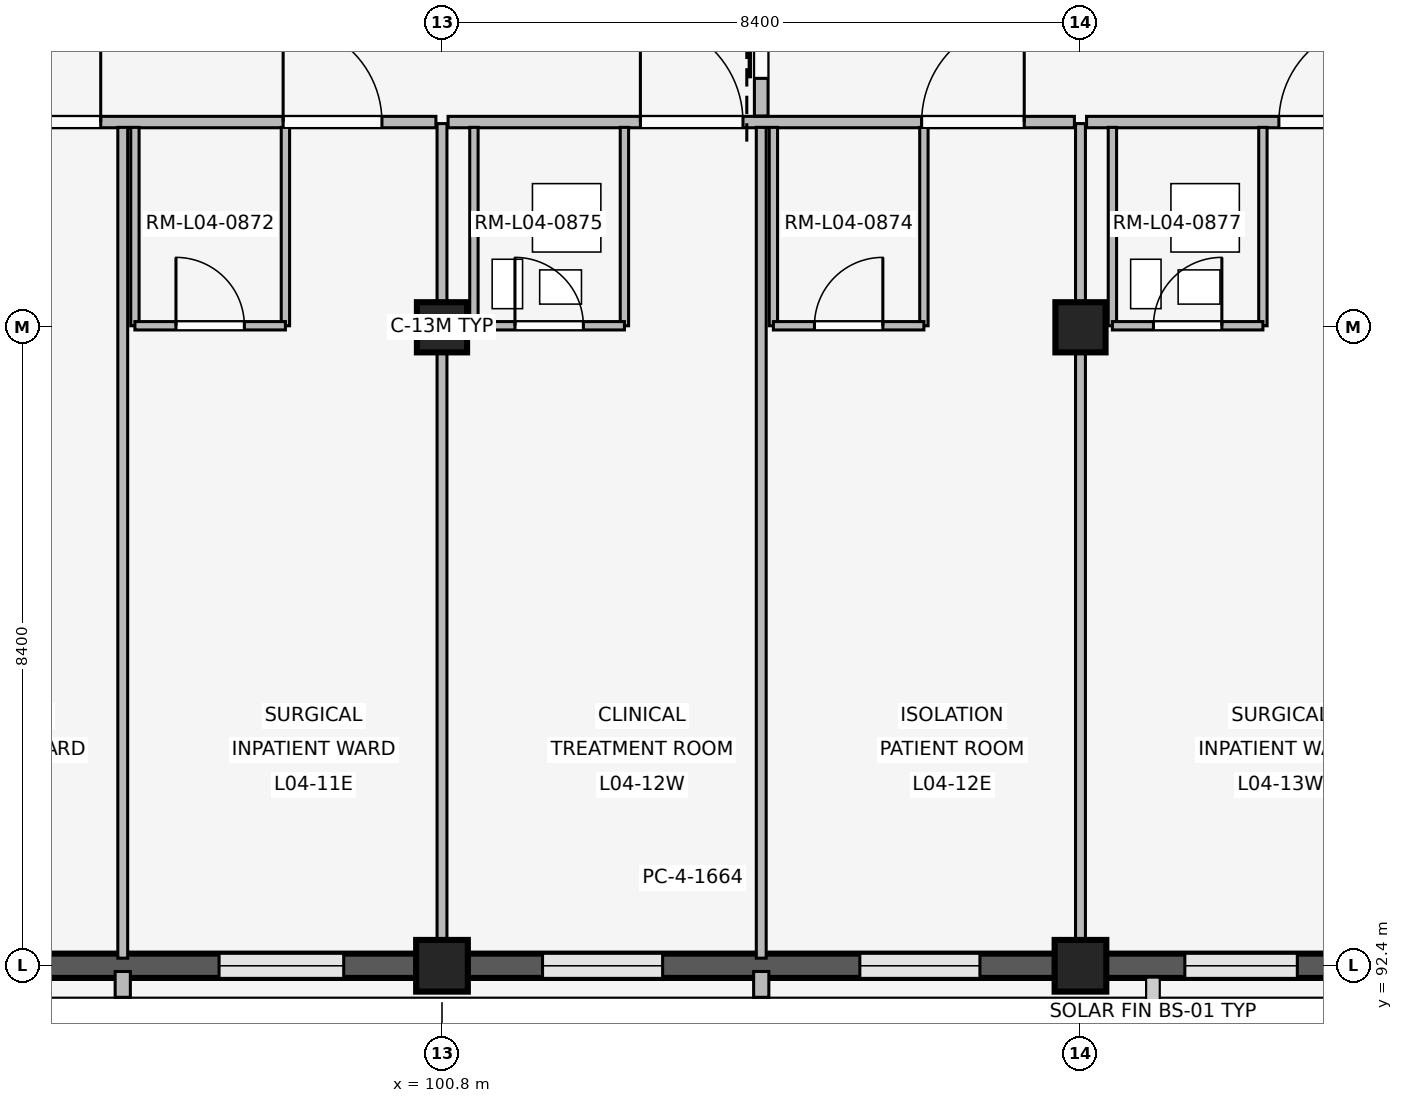
"""IFC4 building model, lengths in metres.
Left out: names, types, materials, properties, quantities, classifications, styles, units other than length and angle.
Written with IfcOpenShell. Run it as: python <this file> out.ifc"""

import sys

from ifc_helpers import new_model, si_unit, direction, frame, frame_2d, origin, origin_2d, place, context, subcontext, project, spatial, rectangle, extrude, element, fill, save


model = new_model("IFC4")
c1 = context("Model", 3, precision=1e-05, world=origin(), true_north=direction((0.0, 1.0)))
c2 = subcontext(c1, "Body", "Model", "MODEL_VIEW")
j1 = project(units=[si_unit("LENGTHUNIT", "METRE"), si_unit("PLANEANGLEUNIT", "RADIAN")], contexts=[c1])
p1 = place(None, origin())
s1 = spatial("IfcSite", under=j1, at=p1, CompositionType="ELEMENT")
p2 = place(p1, origin())
s2 = spatial("IfcBuilding", under=s1, at=p2, CompositionType="ELEMENT")
p3 = place(p2, frame((0.0, 0.0, 16.2)))
s3 = spatial("IfcBuildingStorey", under=s2, at=p3, CompositionType="ELEMENT", Elevation=16.2)
p4 = place(p3, frame((100.8, 92.4, 0.0), z_axis=(0.0, 0.0, 1.0), x_axis=(1.0, 0.0, 0.0)))
e1 = element("IfcColumn", 1, at=p4, inside=s3, PredefinedType="COLUMN", context=c2, shape_type="SweptSolid", body=[
    extrude(rectangle(XDim=0.68, YDim=0.68, at=origin_2d()), origin(), (0.0, 0.0, 1.0), 4.2),
])
p5 = place(p3, frame((100.8, 100.8, 0.0), z_axis=(0.0, 0.0, 1.0), x_axis=(1.0, 0.0, 0.0)))
e2 = element("IfcColumn", 2, at=p5, inside=s3, PredefinedType="COLUMN", context=c2, shape_type="SweptSolid", body=[
    extrude(rectangle(XDim=0.66, YDim=0.66, at=origin_2d()), origin(), (0.0, 0.0, 1.0), 4.2),
])
p6 = place(p3, frame((109.2, 92.4, 0.0), z_axis=(0.0, 0.0, 1.0), x_axis=(1.0, 0.0, 0.0)))
e3 = element("IfcColumn", 3, at=p6, inside=s3, PredefinedType="COLUMN", context=c2, shape_type="SweptSolid", body=[
    extrude(rectangle(XDim=0.68, YDim=0.68, at=origin_2d()), origin(), (0.0, 0.0, 1.0), 4.2),
])
p7 = place(p3, frame((109.2, 100.8, 0.0), z_axis=(0.0, 0.0, 1.0), x_axis=(1.0, 0.0, 0.0)))
e4 = element("IfcColumn", 4, at=p7, inside=s3, PredefinedType="COLUMN", context=c2, shape_type="SweptSolid", body=[
    extrude(rectangle(XDim=0.66, YDim=0.66, at=origin_2d()), origin(), (0.0, 0.0, 1.0), 4.2),
])
p8 = place(p3, frame((100.465, 92.4, 0.0), z_axis=(0.0, 0.0, 1.0), x_axis=(-1.0, 0.0, 0.0)))
e5 = element("IfcWall", 5, at=p8, inside=s3, PredefinedType="SOLIDWALL", context=c2, shape_type="SweptSolid", body=[
    extrude(rectangle(XDim=7.73, YDim=0.32, at=frame_2d((3.865, 0.0))), origin(), (0.0, 0.0, 1.0), 3.32),
])
p9 = place(p8, frame((0.958, 0.0, 0.85)))
e6 = element("IfcOpeningElement", 6, at=p9, cuts=e5, PredefinedType="OPENING", context=c2, shape_type="SweptSolid", body=[
    extrude(rectangle(XDim=1.64, YDim=1.75, at=frame_2d((0.82, 0.875))), frame((0.0, 0.17, 0.0), z_axis=(0.0, -1.0, 0.0), x_axis=(1.0, 0.0, 0.0)), (0.0, 0.0, 1.0), 0.34),
])
p10 = place(p8, frame((5.132, 0.0, 0.85)))
e7 = element("IfcOpeningElement", 7, at=p10, cuts=e5, PredefinedType="OPENING", context=c2, shape_type="SweptSolid", body=[
    extrude(rectangle(XDim=1.64, YDim=1.75, at=frame_2d((0.82, 0.875))), frame((0.0, 0.17, 0.0), z_axis=(0.0, -1.0, 0.0), x_axis=(1.0, 0.0, 0.0)), (0.0, 0.0, 1.0), 0.34),
])
p11 = place(p3, frame((96.6, 92.325, 0.0), z_axis=(0.0, 0.0, 1.0), x_axis=(0.0, -1.0, 0.0)))
e8 = element("IfcWall", 8, at=p11, inside=s3, PredefinedType="ELEMENTEDWALL", context=c2, shape_type="SweptSolid", body=[
    extrude(rectangle(XDim=0.34, YDim=0.2, at=frame_2d((0.17, 0.0))), origin(), (0.0, 0.0, 1.0), 3.3),
])
p12 = place(p3, frame((108.865, 92.4, 0.0), z_axis=(0.0, 0.0, 1.0), x_axis=(-1.0, 0.0, 0.0)))
e9 = element("IfcWall", 9, at=p12, inside=s3, PredefinedType="SOLIDWALL", context=c2, shape_type="SweptSolid", body=[
    extrude(rectangle(XDim=7.73, YDim=0.32, at=frame_2d((3.865, 0.0))), origin(), (0.0, 0.0, 1.0), 3.32),
])
p13 = place(p12, frame((0.988, 0.0, 0.85)))
e10 = element("IfcOpeningElement", 10, at=p13, cuts=e9, PredefinedType="OPENING", context=c2, shape_type="SweptSolid", body=[
    extrude(rectangle(XDim=1.58, YDim=1.7, at=frame_2d((0.79, 0.85))), frame((0.0, 0.17, 0.0), z_axis=(0.0, -1.0, 0.0), x_axis=(1.0, 0.0, 0.0)), (0.0, 0.0, 1.0), 0.34),
])
p14 = place(p12, frame((5.162, 0.0, 0.85)))
e11 = element("IfcOpeningElement", 11, at=p14, cuts=e9, PredefinedType="OPENING", context=c2, shape_type="SweptSolid", body=[
    extrude(rectangle(XDim=1.58, YDim=1.7, at=frame_2d((0.79, 0.85))), frame((0.0, 0.17, 0.0), z_axis=(0.0, -1.0, 0.0), x_axis=(1.0, 0.0, 0.0)), (0.0, 0.0, 1.0), 0.34),
])
p15 = place(p3, frame((105.0, 92.325, 0.0), z_axis=(0.0, 0.0, 1.0), x_axis=(0.0, -1.0, 0.0)))
e12 = element("IfcWall", 12, at=p15, inside=s3, PredefinedType="ELEMENTEDWALL", context=c2, shape_type="SweptSolid", body=[
    extrude(rectangle(XDim=0.34, YDim=0.2, at=frame_2d((0.17, 0.0))), origin(), (0.0, 0.0, 1.0), 3.3),
])
p16 = place(p3, frame((117.265, 92.4, 0.0), z_axis=(0.0, 0.0, 1.0), x_axis=(-1.0, 0.0, 0.0)))
e13 = element("IfcWall", 13, at=p16, inside=s3, PredefinedType="SOLIDWALL", context=c2, shape_type="SweptSolid", body=[
    extrude(rectangle(XDim=7.73, YDim=0.32, at=frame_2d((3.865, 0.0))), origin(), (0.0, 0.0, 1.0), 3.32),
])
p17 = place(p16, frame((1.038, 0.0, 0.85)))
e14 = element("IfcOpeningElement", 14, at=p17, cuts=e13, PredefinedType="OPENING", context=c2, shape_type="SweptSolid", body=[
    extrude(rectangle(XDim=1.48, YDim=1.6, at=frame_2d((0.74, 0.8))), frame((0.0, 0.17, 0.0), z_axis=(0.0, -1.0, 0.0), x_axis=(1.0, 0.0, 0.0)), (0.0, 0.0, 1.0), 0.34),
])
p18 = place(p16, frame((5.212, 0.0, 0.85)))
e15 = element("IfcOpeningElement", 15, at=p18, cuts=e13, PredefinedType="OPENING", context=c2, shape_type="SweptSolid", body=[
    extrude(rectangle(XDim=1.48, YDim=1.6, at=frame_2d((0.74, 0.8))), frame((0.0, 0.17, 0.0), z_axis=(0.0, -1.0, 0.0), x_axis=(1.0, 0.0, 0.0)), (0.0, 0.0, 1.0), 0.34),
])
p19 = place(p3, frame((92.76, 103.5, 0.0), z_axis=(0.0, 0.0, 1.0), x_axis=(1.0, 0.0, 0.0)))
e16 = element("IfcWall", 16, at=p19, inside=s3, PredefinedType="PARTITIONING", context=c2, shape_type="SweptSolid", body=[
    extrude(rectangle(XDim=7.96, YDim=0.15, at=frame_2d((3.98, 0.0))), origin(), (0.0, 0.0, 1.0), 3.3),
])
p20 = place(p19, frame((2.25, 0.0, 0.0)))
e17 = element("IfcOpeningElement", 17, at=p20, cuts=e16, PredefinedType="OPENING", context=c2, shape_type="SweptSolid", body=[
    extrude(rectangle(XDim=1.3, YDim=2.25, at=frame_2d((0.65, 1.125))), frame((0.0, 0.085, 0.0), z_axis=(0.0, -1.0, 0.0), x_axis=(1.0, 0.0, 0.0)), (0.0, 0.0, 1.0), 0.17),
])
p21 = place(p19, frame((5.95, 0.0, 0.0)))
e18 = element("IfcOpeningElement", 18, at=p21, cuts=e16, PredefinedType="OPENING", context=c2, shape_type="SweptSolid", body=[
    extrude(rectangle(XDim=1.3, YDim=2.25, at=frame_2d((0.65, 1.125))), frame((0.0, 0.085, 0.0), z_axis=(0.0, -1.0, 0.0), x_axis=(1.0, 0.0, 0.0)), (0.0, 0.0, 1.0), 0.17),
])
p22 = place(p3, frame((96.6, 92.5, 0.0), z_axis=(0.0, 0.0, 1.0), x_axis=(0.0, 1.0, 0.0)))
e19 = element("IfcWall", 19, at=p22, inside=s3, PredefinedType="PARTITIONING", context=c2, shape_type="SweptSolid", body=[
    extrude(rectangle(XDim=10.93, YDim=0.13, at=frame_2d((5.465, 0.0))), origin(), (0.0, 0.0, 1.0), 3.3),
])
for number, where, z_axis, x_axis in (
    (20, (96.76, 100.82, 0.0), (0.0, 0.0, 1.0), (0.0, 1.0, 0.0)),
    (21, (98.74, 100.82, 0.0), (0.0, 0.0, 1.0), (0.0, 1.0, 0.0)),
):
    element("IfcWall", number, at=place(p3, frame(where, z_axis=z_axis, x_axis=x_axis)), inside=s3, PredefinedType="PARTITIONING", context=c2, shape_type="SweptSolid", body=[
        extrude(rectangle(XDim=2.61, YDim=0.11, at=frame_2d((1.305, 0.0))), origin(), (0.0, 0.0, 1.0), 3.3),
    ])
p23 = place(p3, frame((96.76, 100.82, 0.0), z_axis=(0.0, 0.0, 1.0), x_axis=(1.0, 0.0, 0.0)))
e22 = element("IfcWall", 22, at=p23, inside=s3, PredefinedType="PARTITIONING", context=c2, shape_type="SweptSolid", body=[
    extrude(rectangle(XDim=1.98, YDim=0.11, at=frame_2d((0.99, 0.0))), origin(), (0.0, 0.0, 1.0), 3.3),
])
p24 = place(p23, frame((0.54, 0.0, 0.0)))
e23 = element("IfcOpeningElement", 23, at=p24, cuts=e22, PredefinedType="OPENING", context=c2, shape_type="SweptSolid", body=[
    extrude(rectangle(XDim=0.9, YDim=2.1, at=frame_2d((0.45, 1.05))), frame((0.0, 0.065, 0.0), z_axis=(0.0, -1.0, 0.0), x_axis=(1.0, 0.0, 0.0)), (0.0, 0.0, 1.0), 0.13),
])
p25 = place(p3, frame((100.8, 92.54, 0.0), z_axis=(0.0, 0.0, 1.0), x_axis=(0.0, 1.0, 0.0)))
e24 = element("IfcWall", 24, at=p25, inside=s3, PredefinedType="PARTITIONING", context=c2, shape_type="SweptSolid", body=[
    extrude(rectangle(XDim=10.94, YDim=0.13, at=frame_2d((5.47, 0.0))), origin(), (0.0, 0.0, 1.0), 3.3),
])
p26 = place(p3, frame((100.88, 103.5, 0.0), z_axis=(0.0, 0.0, 1.0), x_axis=(1.0, 0.0, 0.0)))
e25 = element("IfcWall", 25, at=p26, inside=s3, PredefinedType="PARTITIONING", context=c2, shape_type="SweptSolid", body=[
    extrude(rectangle(XDim=8.24, YDim=0.15, at=frame_2d((4.12, 0.0))), origin(), (0.0, 0.0, 1.0), 3.3),
])
p27 = place(p26, frame((2.53, 0.0, 0.0)))
e26 = element("IfcOpeningElement", 26, at=p27, cuts=e25, PredefinedType="OPENING", context=c2, shape_type="SweptSolid", body=[
    extrude(rectangle(XDim=1.35, YDim=2.25, at=frame_2d((0.675, 1.125))), frame((0.0, 0.085, 0.0), z_axis=(0.0, -1.0, 0.0), x_axis=(1.0, 0.0, 0.0)), (0.0, 0.0, 1.0), 0.17),
])
p28 = place(p26, frame((6.23, 0.0, 0.0)))
e27 = element("IfcOpeningElement", 27, at=p28, cuts=e25, PredefinedType="OPENING", context=c2, shape_type="SweptSolid", body=[
    extrude(rectangle(XDim=1.35, YDim=2.25, at=frame_2d((0.675, 1.125))), frame((0.0, 0.085, 0.0), z_axis=(0.0, -1.0, 0.0), x_axis=(1.0, 0.0, 0.0)), (0.0, 0.0, 1.0), 0.17),
])
p29 = place(p3, frame((105.0, 92.5, 0.0), z_axis=(0.0, 0.0, 1.0), x_axis=(0.0, 1.0, 0.0)))
e28 = element("IfcWall", 28, at=p29, inside=s3, PredefinedType="PARTITIONING", context=c2, shape_type="SweptSolid", body=[
    extrude(rectangle(XDim=10.93, YDim=0.13, at=frame_2d((5.465, 0.0))), origin(), (0.0, 0.0, 1.0), 3.3),
])
for number, where, z_axis, x_axis in (
    (29, (101.22, 100.82, 0.0), (0.0, 0.0, 1.0), (0.0, 1.0, 0.0)),
    (30, (103.2, 100.82, 0.0), (0.0, 0.0, 1.0), (0.0, 1.0, 0.0)),
):
    element("IfcWall", number, at=place(p3, frame(where, z_axis=z_axis, x_axis=x_axis)), inside=s3, PredefinedType="PARTITIONING", context=c2, shape_type="SweptSolid", body=[
        extrude(rectangle(XDim=2.61, YDim=0.11, at=frame_2d((1.305, 0.0))), origin(), (0.0, 0.0, 1.0), 3.3),
    ])
p30 = place(p3, frame((101.22, 100.82, 0.0), z_axis=(0.0, 0.0, 1.0), x_axis=(1.0, 0.0, 0.0)))
e31 = element("IfcWall", 31, at=p30, inside=s3, PredefinedType="PARTITIONING", context=c2, shape_type="SweptSolid", body=[
    extrude(rectangle(XDim=1.98, YDim=0.11, at=frame_2d((0.99, 0.0))), origin(), (0.0, 0.0, 1.0), 3.3),
])
p31 = place(p30, frame((0.54, 0.0, 0.0)))
e32 = element("IfcOpeningElement", 32, at=p31, cuts=e31, PredefinedType="OPENING", context=c2, shape_type="SweptSolid", body=[
    extrude(rectangle(XDim=0.9, YDim=2.1, at=frame_2d((0.45, 1.05))), frame((0.0, 0.065, 0.0), z_axis=(0.0, -1.0, 0.0), x_axis=(1.0, 0.0, 0.0)), (0.0, 0.0, 1.0), 0.13),
])
for number, where, z_axis, x_axis in (
    (33, (105.16, 100.82, 0.0), (0.0, 0.0, 1.0), (0.0, 1.0, 0.0)),
    (34, (107.14, 100.82, 0.0), (0.0, 0.0, 1.0), (0.0, 1.0, 0.0)),
):
    element("IfcWall", number, at=place(p3, frame(where, z_axis=z_axis, x_axis=x_axis)), inside=s3, PredefinedType="PARTITIONING", context=c2, shape_type="SweptSolid", body=[
        extrude(rectangle(XDim=2.61, YDim=0.11, at=frame_2d((1.305, 0.0))), origin(), (0.0, 0.0, 1.0), 3.3),
    ])
p32 = place(p3, frame((105.16, 100.82, 0.0), z_axis=(0.0, 0.0, 1.0), x_axis=(1.0, 0.0, 0.0)))
e35 = element("IfcWall", 35, at=p32, inside=s3, PredefinedType="PARTITIONING", context=c2, shape_type="SweptSolid", body=[
    extrude(rectangle(XDim=1.98, YDim=0.11, at=frame_2d((0.99, 0.0))), origin(), (0.0, 0.0, 1.0), 3.3),
])
p33 = place(p32, frame((0.54, 0.0, 0.0)))
e36 = element("IfcOpeningElement", 36, at=p33, cuts=e35, PredefinedType="OPENING", context=c2, shape_type="SweptSolid", body=[
    extrude(rectangle(XDim=0.9, YDim=2.1, at=frame_2d((0.45, 1.05))), frame((0.0, 0.065, 0.0), z_axis=(0.0, -1.0, 0.0), x_axis=(1.0, 0.0, 0.0)), (0.0, 0.0, 1.0), 0.13),
])
p34 = place(p3, frame((103.65, 93.55, 0.0), z_axis=(0.0, 0.0, 1.0), x_axis=(1.0, 0.0, 0.0)))
e37 = element("IfcWall", 37, at=p34, inside=s3, PredefinedType="PLUMBINGWALL", context=c2, shape_type="SweptSolid", body=[
    extrude(rectangle(XDim=0.9, YDim=0.24, at=frame_2d((0.45, 0.0))), origin(), (0.0, 0.0, 1.0), 3.3),
])
p35 = place(p3, frame((105.0, 103.58, 0.0), z_axis=(0.0, 0.0, 1.0), x_axis=(0.0, 1.0, 0.0)))
e38 = element("IfcWall", 38, at=p35, inside=s3, PredefinedType="PARTITIONING", context=c2, shape_type="SweptSolid", body=[
    extrude(rectangle(XDim=2.84, YDim=0.18, at=frame_2d((1.42, 0.0))), origin(), (0.0, 0.0, 1.0), 3.3),
])
p36 = place(p35, frame((0.495, 0.0, 0.0)))
e39 = element("IfcOpeningElement", 39, at=p36, cuts=e38, PredefinedType="OPENING", context=c2, shape_type="SweptSolid", body=[
    extrude(rectangle(XDim=1.85, YDim=2.3, at=frame_2d((0.925, 1.15))), frame((0.0, 0.1, 0.0), z_axis=(0.0, -1.0, 0.0), x_axis=(1.0, 0.0, 0.0)), (0.0, 0.0, 1.0), 0.2),
])
p37 = place(p3, frame((109.2, 92.54, 0.0), z_axis=(0.0, 0.0, 1.0), x_axis=(0.0, 1.0, 0.0)))
e40 = element("IfcWall", 40, at=p37, inside=s3, PredefinedType="PARTITIONING", context=c2, shape_type="SweptSolid", body=[
    extrude(rectangle(XDim=10.94, YDim=0.13, at=frame_2d((5.47, 0.0))), origin(), (0.0, 0.0, 1.0), 3.3),
])
p38 = place(p3, frame((109.28, 103.5, 0.0), z_axis=(0.0, 0.0, 1.0), x_axis=(1.0, 0.0, 0.0)))
e41 = element("IfcWall", 41, at=p38, inside=s3, PredefinedType="PARTITIONING", context=c2, shape_type="SweptSolid", body=[
    extrude(rectangle(XDim=8.24, YDim=0.15, at=frame_2d((4.12, 0.0))), origin(), (0.0, 0.0, 1.0), 3.3),
])
p39 = place(p38, frame((2.53, 0.0, 0.0)))
e42 = element("IfcOpeningElement", 42, at=p39, cuts=e41, PredefinedType="OPENING", context=c2, shape_type="SweptSolid", body=[
    extrude(rectangle(XDim=1.3, YDim=2.25, at=frame_2d((0.65, 1.125))), frame((0.0, 0.085, 0.0), z_axis=(0.0, -1.0, 0.0), x_axis=(1.0, 0.0, 0.0)), (0.0, 0.0, 1.0), 0.17),
])
p40 = place(p38, frame((6.23, 0.0, 0.0)))
e43 = element("IfcOpeningElement", 43, at=p40, cuts=e41, PredefinedType="OPENING", context=c2, shape_type="SweptSolid", body=[
    extrude(rectangle(XDim=1.3, YDim=2.25, at=frame_2d((0.65, 1.125))), frame((0.0, 0.085, 0.0), z_axis=(0.0, -1.0, 0.0), x_axis=(1.0, 0.0, 0.0)), (0.0, 0.0, 1.0), 0.17),
])
for number, where, z_axis, x_axis in (
    (44, (109.62, 100.82, 0.0), (0.0, 0.0, 1.0), (0.0, 1.0, 0.0)),
    (45, (111.6, 100.82, 0.0), (0.0, 0.0, 1.0), (0.0, 1.0, 0.0)),
):
    element("IfcWall", number, at=place(p3, frame(where, z_axis=z_axis, x_axis=x_axis)), inside=s3, PredefinedType="PARTITIONING", context=c2, shape_type="SweptSolid", body=[
        extrude(rectangle(XDim=2.61, YDim=0.11, at=frame_2d((1.305, 0.0))), origin(), (0.0, 0.0, 1.0), 3.3),
    ])
p41 = place(p3, frame((109.62, 100.82, 0.0), z_axis=(0.0, 0.0, 1.0), x_axis=(1.0, 0.0, 0.0)))
e46 = element("IfcWall", 46, at=p41, inside=s3, PredefinedType="PARTITIONING", context=c2, shape_type="SweptSolid", body=[
    extrude(rectangle(XDim=1.98, YDim=0.11, at=frame_2d((0.99, 0.0))), origin(), (0.0, 0.0, 1.0), 3.3),
])
p42 = place(p41, frame((0.54, 0.0, 0.0)))
e47 = element("IfcOpeningElement", 47, at=p42, cuts=e46, PredefinedType="OPENING", context=c2, shape_type="SweptSolid", body=[
    extrude(rectangle(XDim=0.9, YDim=2.1, at=frame_2d((0.45, 1.05))), frame((0.0, 0.065, 0.0), z_axis=(0.0, -1.0, 0.0), x_axis=(1.0, 0.0, 0.0)), (0.0, 0.0, 1.0), 0.13),
])
p43 = place(p9, origin())
e48 = element("IfcWindow", 48, at=p43, inside=s3, PartitioningType="SINGLE_PANEL", PredefinedType="WINDOW", context=c2, shape_type="SweptSolid", body=[
    extrude(rectangle(XDim=1.64, YDim=1.75, at=frame_2d((0.82, 0.875))), frame((0.0, 0.03, 0.0), z_axis=(0.0, -1.0, 0.0), x_axis=(1.0, 0.0, 0.0)), (0.0, 0.0, 1.0), 0.06),
])
fill(e6, e48)
p44 = place(p13, origin())
e49 = element("IfcWindow", 49, at=p44, inside=s3, PartitioningType="SINGLE_PANEL", PredefinedType="WINDOW", context=c2, shape_type="SweptSolid", body=[
    extrude(rectangle(XDim=1.58, YDim=1.7, at=frame_2d((0.79, 0.85))), frame((0.0, 0.03, 0.0), z_axis=(0.0, -1.0, 0.0), x_axis=(1.0, 0.0, 0.0)), (0.0, 0.0, 1.0), 0.06),
])
fill(e10, e49)
p45 = place(p14, origin())
e50 = element("IfcWindow", 50, at=p45, inside=s3, PartitioningType="SINGLE_PANEL", PredefinedType="WINDOW", context=c2, shape_type="SweptSolid", body=[
    extrude(rectangle(XDim=1.58, YDim=1.7, at=frame_2d((0.79, 0.85))), frame((0.0, 0.03, 0.0), z_axis=(0.0, -1.0, 0.0), x_axis=(1.0, 0.0, 0.0)), (0.0, 0.0, 1.0), 0.06),
])
fill(e11, e50)
p46 = place(p18, origin())
e51 = element("IfcWindow", 51, at=p46, inside=s3, PartitioningType="SINGLE_PANEL", PredefinedType="WINDOW", context=c2, shape_type="SweptSolid", body=[
    extrude(rectangle(XDim=1.48, YDim=1.6, at=frame_2d((0.74, 0.8))), frame((0.0, 0.03, 0.0), z_axis=(0.0, -1.0, 0.0), x_axis=(1.0, 0.0, 0.0)), (0.0, 0.0, 1.0), 0.06),
])
fill(e15, e51)
p47 = place(p20, origin())
e52 = element("IfcDoor", 52, at=p47, inside=s3, OperationType="SINGLE_SWING_RIGHT", PredefinedType="DOOR", context=c2, shape_type="SweptSolid", body=[
    extrude(rectangle(XDim=1.3, YDim=2.25, at=frame_2d((0.65, 1.125))), frame((0.0, 0.025, 0.0), z_axis=(0.0, -1.0, 0.0), x_axis=(1.0, 0.0, 0.0)), (0.0, 0.0, 1.0), 0.05),
])
fill(e17, e52)
p48 = place(p21, origin())
e53 = element("IfcDoor", 53, at=p48, inside=s3, OperationType="SINGLE_SWING_LEFT", PredefinedType="DOOR", context=c2, shape_type="SweptSolid", body=[
    extrude(rectangle(XDim=1.3, YDim=2.25, at=frame_2d((0.65, 1.125))), frame((0.0, 0.025, 0.0), z_axis=(0.0, -1.0, 0.0), x_axis=(1.0, 0.0, 0.0)), (0.0, 0.0, 1.0), 0.05),
])
fill(e18, e53)
p49 = place(p24, origin())
e54 = element("IfcDoor", 54, at=p49, inside=s3, OperationType="SINGLE_SWING_LEFT", PredefinedType="DOOR", context=c2, shape_type="SweptSolid", body=[
    extrude(rectangle(XDim=0.9, YDim=2.1, at=frame_2d((0.45, 1.05))), frame((0.0, 0.025, 0.0), z_axis=(0.0, -1.0, 0.0), x_axis=(1.0, 0.0, 0.0)), (0.0, 0.0, 1.0), 0.05),
])
fill(e23, e54)
p50 = place(p27, origin())
e55 = element("IfcDoor", 55, at=p50, inside=s3, OperationType="SINGLE_SWING_LEFT", PredefinedType="DOOR", context=c2, shape_type="SweptSolid", body=[
    extrude(rectangle(XDim=1.35, YDim=2.25, at=frame_2d((0.675, 1.125))), frame((0.0, 0.025, 0.0), z_axis=(0.0, -1.0, 0.0), x_axis=(1.0, 0.0, 0.0)), (0.0, 0.0, 1.0), 0.05),
])
fill(e26, e55)
p51 = place(p28, origin())
e56 = element("IfcDoor", 56, at=p51, inside=s3, OperationType="SINGLE_SWING_RIGHT", PredefinedType="DOOR", context=c2, shape_type="SweptSolid", body=[
    extrude(rectangle(XDim=1.35, YDim=2.25, at=frame_2d((0.675, 1.125))), frame((0.0, 0.025, 0.0), z_axis=(0.0, -1.0, 0.0), x_axis=(1.0, 0.0, 0.0)), (0.0, 0.0, 1.0), 0.05),
])
fill(e27, e56)
p52 = place(p31, origin())
e57 = element("IfcDoor", 57, at=p52, inside=s3, OperationType="SINGLE_SWING_LEFT", PredefinedType="DOOR", context=c2, shape_type="SweptSolid", body=[
    extrude(rectangle(XDim=0.9, YDim=2.1, at=frame_2d((0.45, 1.05))), frame((0.0, 0.025, 0.0), z_axis=(0.0, -1.0, 0.0), x_axis=(1.0, 0.0, 0.0)), (0.0, 0.0, 1.0), 0.05),
])
fill(e32, e57)
p53 = place(p33, origin())
e58 = element("IfcDoor", 58, at=p53, inside=s3, OperationType="SINGLE_SWING_RIGHT", PredefinedType="DOOR", context=c2, shape_type="SweptSolid", body=[
    extrude(rectangle(XDim=0.9, YDim=2.1, at=frame_2d((0.45, 1.05))), frame((0.0, 0.025, 0.0), z_axis=(0.0, -1.0, 0.0), x_axis=(1.0, 0.0, 0.0)), (0.0, 0.0, 1.0), 0.05),
])
fill(e36, e58)
p54 = place(p36, origin())
e59 = element("IfcDoor", 59, at=p54, inside=s3, OperationType="SLIDING_TO_LEFT", PredefinedType="DOOR", context=c2, shape_type="SweptSolid", body=[
    extrude(rectangle(XDim=1.85, YDim=2.3, at=frame_2d((0.925, 1.15))), frame((0.0, 0.025, 0.0), z_axis=(0.0, -1.0, 0.0), x_axis=(1.0, 0.0, 0.0)), (0.0, 0.0, 1.0), 0.05),
])
fill(e39, e59)
p55 = place(p39, origin())
e60 = element("IfcDoor", 60, at=p55, inside=s3, OperationType="SINGLE_SWING_RIGHT", PredefinedType="DOOR", context=c2, shape_type="SweptSolid", body=[
    extrude(rectangle(XDim=1.3, YDim=2.25, at=frame_2d((0.65, 1.125))), frame((0.0, 0.025, 0.0), z_axis=(0.0, -1.0, 0.0), x_axis=(1.0, 0.0, 0.0)), (0.0, 0.0, 1.0), 0.05),
])
fill(e42, e60)
p56 = place(p42, origin())
e61 = element("IfcDoor", 61, at=p56, inside=s3, OperationType="SINGLE_SWING_RIGHT", PredefinedType="DOOR", context=c2, shape_type="SweptSolid", body=[
    extrude(rectangle(XDim=0.9, YDim=2.1, at=frame_2d((0.45, 1.05))), frame((0.0, 0.025, 0.0), z_axis=(0.0, -1.0, 0.0), x_axis=(1.0, 0.0, 0.0)), (0.0, 0.0, 1.0), 0.05),
])
fill(e47, e61)
save(model, sys.argv[1])
